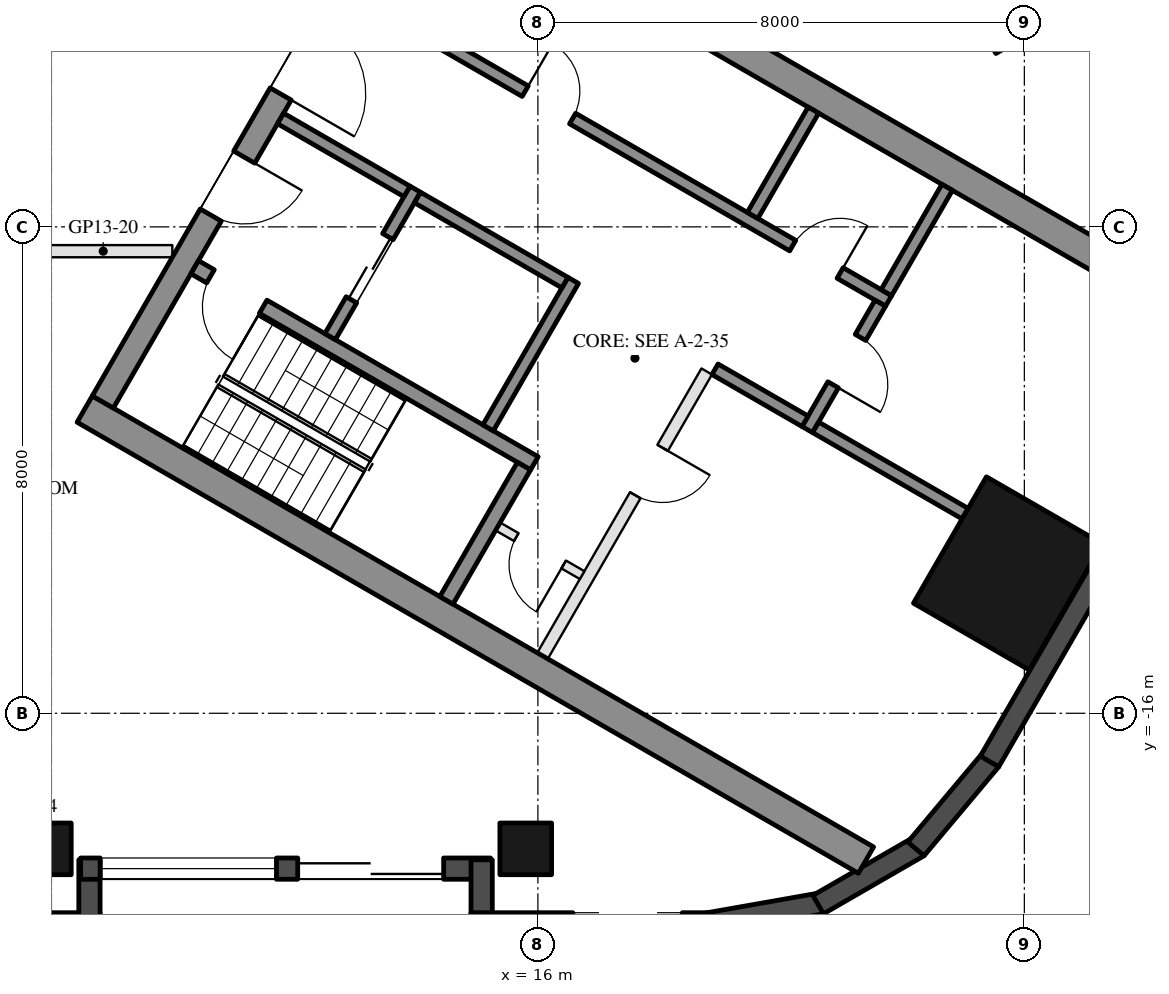
"""IFC4 building model, lengths in metres.
Left out: names, types, materials, properties, quantities, classifications, styles, units other than length and angle.
Written with IfcOpenShell. Run it as: python <this file> out.ifc"""

import sys

from ifc_helpers import new_model, si_unit, direction, frame, frame_2d, origin, origin_2d, place, context, subcontext, project, spatial, rectangle, hollow_rectangle, extrude, element, fill, save


model = new_model("IFC4")
c1 = context("Model", 3, precision=1e-05, world=origin(), true_north=direction((0.0, 1.0)))
c2 = subcontext(c1, "Body", "Model", "MODEL_VIEW")
j1 = project(units=[si_unit("LENGTHUNIT", "METRE"), si_unit("PLANEANGLEUNIT", "RADIAN")], contexts=[c1])
p1 = place(None, origin())
s1 = spatial("IfcSite", under=j1, at=p1, CompositionType="ELEMENT")
p2 = place(p1, origin())
s2 = spatial("IfcBuilding", under=s1, at=p2, CompositionType="ELEMENT")
p3 = place(p2, frame((0.0, 0.0, 154.0)))
s3 = spatial("IfcBuildingStorey", under=s2, at=p3, CompositionType="ELEMENT", Elevation=154.0)
for number, where, z_axis, x_axis in (
    (1, (7.9, -18.23, 0.0), (0.0, 0.0, 1.0), (-1.0, 0.0, 0.0)),
    (2, (15.8, -18.23, 0.0), (0.0, 0.0, 1.0), (-1.0, 0.0, 0.0)),
    (3, (23.688, -4.568, 0.0), (0.0, 0.0, 1.0), (-0.5, 0.866, 0.0)),
):
    element("IfcColumn", number, at=place(p3, frame(where, z_axis=z_axis, x_axis=x_axis)), inside=s3, PredefinedType="COLUMN", context=c2, shape_type="SweptSolid", body=[
        extrude(hollow_rectangle(XDim=0.85, YDim=0.85, WallThickness=0.04, at=origin_2d()), origin(), (0.0, 0.0, 1.0), 3.7),
    ])
p4 = place(p3, frame((23.729, -13.7, 0.0), z_axis=(0.0, 0.0, 1.0), x_axis=(0.5, 0.866025403784, 0.0)))
e4 = element("IfcColumn", 4, at=p4, inside=s3, PredefinedType="COLUMN", context=c2, shape_type="SweptSolid", body=[
    extrude(hollow_rectangle(XDim=2.4, YDim=2.2, WallThickness=0.06, at=origin_2d()), origin(), (0.0, 0.0, 1.0), 3.7),
])
p5 = place(p3, frame((-0.9, -19.455, 0.0), z_axis=(0.0, 0.0, 1.0), x_axis=(1.0, 0.0, 0.0)))
e5 = element("IfcWall", 5, at=p5, inside=s3, PredefinedType="SOLIDWALL", context=c2, shape_type="SweptSolid", body=[
    extrude(rectangle(XDim=9.7, YDim=0.35, at=frame_2d((4.85, 0.0))), origin(), (0.0, 0.0, 1.0), 3.55),
])
p6 = place(p5, frame((5.3, 0.0, 0.3)))
e6 = element("IfcOpeningElement", 6, at=p6, cuts=e5, PredefinedType="OPENING", context=c2, shape_type="SweptSolid", body=[
    extrude(rectangle(XDim=2.7, YDim=2.65, at=frame_2d((1.35, 1.325))), frame((0.0, 0.185, 0.0), z_axis=(0.0, -1.0, 0.0), x_axis=(1.0, 0.0, 0.0)), (0.0, 0.0, 1.0), 0.37),
])
p7 = place(p3, frame((8.625, -19.63, 0.0), z_axis=(0.0, 0.0, 1.0), x_axis=(0.0, 1.0, 0.0)))
e7 = element("IfcWall", 7, at=p7, inside=s3, PredefinedType="SOLIDWALL", context=c2, shape_type="SweptSolid", body=[
    extrude(rectangle(XDim=1.22, YDim=0.35, at=frame_2d((0.61, 0.0))), origin(), (0.0, 0.0, 1.0), 3.55),
])
p8 = place(p3, frame((8.48, -18.555, 0.0), z_axis=(0.0, 0.0, 1.0), x_axis=(1.0, 0.0, 0.0)))
e8 = element("IfcWall", 8, at=p8, inside=s3, PredefinedType="SOLIDWALL", context=c2, shape_type="SweptSolid", body=[
    extrude(rectangle(XDim=6.74, YDim=0.35, at=frame_2d((3.37, 0.0))), origin(), (0.0, 0.0, 1.0), 3.55),
])
p9 = place(p8, frame((3.57, 0.0, 0.0)))
e9 = element("IfcOpeningElement", 9, at=p9, cuts=e8, PredefinedType="OPENING", context=c2, shape_type="SweptSolid", body=[
    extrude(rectangle(XDim=2.4, YDim=2.4, at=frame_2d((1.2, 1.2))), frame((0.0, 0.185, 0.0), z_axis=(0.0, -1.0, 0.0), x_axis=(1.0, 0.0, 0.0)), (0.0, 0.0, 1.0), 0.37),
])
p10 = place(p8, frame((0.32, 0.0, 0.3)))
e10 = element("IfcOpeningElement", 10, at=p10, cuts=e8, PredefinedType="OPENING", context=c2, shape_type="SweptSolid", body=[
    extrude(rectangle(XDim=2.9, YDim=2.65, at=frame_2d((1.45, 1.325))), frame((0.0, 0.185, 0.0), z_axis=(0.0, -1.0, 0.0), x_axis=(1.0, 0.0, 0.0)), (0.0, 0.0, 1.0), 0.37),
])
p11 = place(p3, frame((15.075, -18.41, 0.0), z_axis=(0.0, 0.0, 1.0), x_axis=(0.0, -1.0, 0.0)))
e11 = element("IfcWall", 11, at=p11, inside=s3, PredefinedType="SOLIDWALL", context=c2, shape_type="SweptSolid", body=[
    extrude(rectangle(XDim=1.22, YDim=0.35, at=frame_2d((0.61, 0.0))), origin(), (0.0, 0.0, 1.0), 3.55),
])
p12 = place(p3, frame((14.9, -19.455, 0.0), z_axis=(0.0, 0.0, 1.0), x_axis=(1.0, 0.0, 0.0)))
e12 = element("IfcWall", 12, at=p12, inside=s3, PredefinedType="SOLIDWALL", context=c2, shape_type="SweptSolid", body=[
    extrude(rectangle(XDim=3.916, YDim=0.35, at=frame_2d((1.958, 0.0))), origin(), (0.0, 0.0, 1.0), 3.55),
])
p13 = place(p12, frame((1.675, 0.0, 0.3)))
e13 = element("IfcOpeningElement", 13, at=p13, cuts=e12, PredefinedType="OPENING", context=c2, shape_type="SweptSolid", body=[
    extrude(rectangle(XDim=1.8, YDim=2.65, at=frame_2d((0.9, 1.325))), frame((0.0, 0.185, 0.0), z_axis=(0.0, -1.0, 0.0), x_axis=(1.0, 0.0, 0.0)), (0.0, 0.0, 1.0), 0.37),
])
p14 = place(p3, frame((18.785, -19.458, 0.0), z_axis=(0.0, 0.0, 1.0), x_axis=(0.984798995425, 0.173697837091, 0.0)))
e14 = element("IfcWall", 14, at=p14, inside=s3, PredefinedType="SOLIDWALL", context=c2, shape_type="SweptSolid", body=[
    extrude(rectangle(XDim=1.91, YDim=0.35, at=frame_2d((0.955, 0.0))), origin(), (0.0, 0.0, 1.0), 3.55),
])
for number, where, z_axis, x_axis in (
    (15, (20.61, -19.147, 0.0), (0.0, 0.0, 1.0), (0.866, 0.5, 0.0)),
    (16, (22.217, -18.231, 0.0), (0.0, 0.0, 1.0), (0.643, 0.766, 0.0)),
):
    element("IfcWall", number, at=place(p3, frame(where, z_axis=z_axis, x_axis=x_axis)), inside=s3, PredefinedType="SOLIDWALL", context=c2, shape_type="SweptSolid", body=[
        extrude(rectangle(XDim=1.91, YDim=0.35, at=frame_2d((0.955, 0.0))), origin(), (0.0, 0.0, 1.0), 3.55),
    ])
p15 = place(p3, frame((23.427, -16.792, 0.0), z_axis=(0.0, 0.0, 1.0), x_axis=(0.500018773155, 0.866014564827, 0.0)))
e17 = element("IfcWall", 17, at=p15, inside=s3, PredefinedType="SOLIDWALL", context=c2, shape_type="SweptSolid", body=[
    extrude(rectangle(XDim=5.658, YDim=0.35, at=frame_2d((2.829, 0.0))), origin(), (0.0, 0.0, 1.0), 3.55),
])
p16 = place(p3, frame((26.257, -6.567, 0.0), z_axis=(0.0, 0.0, 1.0), x_axis=(-0.500023526245, 0.866011820475, 0.0)))
e18 = element("IfcWall", 18, at=p16, inside=s3, PredefinedType="SOLIDWALL", context=c2, shape_type="SweptSolid", body=[
    extrude(rectangle(XDim=11.816, YDim=0.35, at=frame_2d((5.908, 0.0))), origin(), (0.0, 0.0, 1.0), 3.55),
])
p17 = place(p16, frame((0.38, 0.0, 0.3)))
e19 = element("IfcOpeningElement", 19, at=p17, cuts=e18, PredefinedType="OPENING", context=c2, shape_type="SweptSolid", body=[
    extrude(rectangle(XDim=1.8, YDim=2.65, at=frame_2d((0.9, 1.325))), frame((0.0, 0.185, 0.0), z_axis=(0.0, -1.0, 0.0), x_axis=(1.0, 0.0, 0.0)), (0.0, 0.0, 1.0), 0.37),
])
p18 = place(p16, frame((7.741, 0.0, 0.0)))
e20 = element("IfcOpeningElement", 20, at=p18, cuts=e18, PredefinedType="OPENING", context=c2, shape_type="SweptSolid", body=[
    extrude(rectangle(XDim=2.4, YDim=2.4, at=frame_2d((1.2, 1.2))), frame((0.0, 0.185, 0.0), z_axis=(0.0, -1.0, 0.0), x_axis=(1.0, 0.0, 0.0)), (0.0, 0.0, 1.0), 0.37),
])
p19 = place(p16, frame((3.791, 0.0, 0.3)))
e21 = element("IfcOpeningElement", 21, at=p19, cuts=e18, PredefinedType="OPENING", context=c2, shape_type="SweptSolid", body=[
    extrude(rectangle(XDim=1.6, YDim=2.65, at=frame_2d((0.8, 1.325))), frame((0.0, 0.185, 0.0), z_axis=(0.0, -1.0, 0.0), x_axis=(1.0, 0.0, 0.0)), (0.0, 0.0, 1.0), 0.37),
])
p20 = place(p16, frame((5.691, 0.0, 0.3)))
e22 = element("IfcOpeningElement", 22, at=p20, cuts=e18, PredefinedType="OPENING", context=c2, shape_type="SweptSolid", body=[
    extrude(rectangle(XDim=1.6, YDim=2.65, at=frame_2d((0.8, 1.325))), frame((0.0, 0.185, 0.0), z_axis=(0.0, -1.0, 0.0), x_axis=(1.0, 0.0, 0.0)), (0.0, 0.0, 1.0), 0.37),
])
for number, where, z_axis, x_axis in (
    (23, (8.547, -10.997, 0.0), (0.0, 0.0, 1.0), (0.866, -0.5, 0.0)),
    (24, (13.797, -1.903, 0.0), (0.0, 0.0, 1.0), (0.866, -0.5, 0.0)),
):
    element("IfcWall", number, at=place(p3, frame(where, z_axis=z_axis, x_axis=x_axis)), inside=s3, PredefinedType="SHEAR", context=c2, shape_type="SweptSolid", body=[
        extrude(rectangle(XDim=14.837, YDim=0.5, at=frame_2d((7.418, 0.0))), origin(), (0.0, 0.0, 1.0), 3.5),
    ])
p21 = place(p3, frame((8.845, -10.88, 0.0), z_axis=(0.0, 0.0, 1.0), x_axis=(0.500004234368, 0.866022959057, 0.0)))
e25 = element("IfcWall", 25, at=p21, inside=s3, PredefinedType="SHEAR", context=c2, shape_type="SweptSolid", body=[
    extrude(rectangle(XDim=10.0, YDim=0.4, at=frame_2d((5.0, 0.0))), origin(), (0.0, 0.0, 1.0), 3.5),
])
p22 = place(p21, frame((3.55, 0.0, 0.0)))
e26 = element("IfcOpeningElement", 26, at=p22, cuts=e25, PredefinedType="OPENING", context=c2, shape_type="SweptSolid", body=[
    extrude(rectangle(XDim=1.1, YDim=2.1, at=frame_2d((0.55, 1.05))), frame((0.0, 0.21, 0.0), z_axis=(0.0, -1.0, 0.0), x_axis=(1.0, 0.0, 0.0)), (0.0, 0.0, 1.0), 0.42),
])
p23 = place(p21, frame((5.85, 0.0, 0.0)))
e27 = element("IfcOpeningElement", 27, at=p23, cuts=e25, PredefinedType="OPENING", context=c2, shape_type="SweptSolid", body=[
    extrude(rectangle(XDim=1.4, YDim=2.1, at=frame_2d((0.7, 1.05))), frame((0.0, 0.21, 0.0), z_axis=(0.0, -1.0, 0.0), x_axis=(1.0, 0.0, 0.0)), (0.0, 0.0, 1.0), 0.42),
])
p24 = place(p3, frame((10.356, -8.664, 0.0), z_axis=(0.0, 0.0, 1.0), x_axis=(0.866028629588, -0.499994412703, 0.0)))
e28 = element("IfcWall", 28, at=p24, inside=s3, PredefinedType="SHEAR", context=c2, shape_type="SweptSolid", body=[
    extrude(rectangle(XDim=6.45, YDim=0.25, at=frame_2d((3.225, 0.0))), origin(), (0.0, 0.0, 1.0), 3.5),
])
p25 = place(p24, frame((0.3, 0.0, 0.0)))
e29 = element("IfcOpeningElement", 29, at=p25, cuts=e28, PredefinedType="OPENING", context=c2, shape_type="SweptSolid", body=[
    extrude(rectangle(XDim=1.0, YDim=2.1, at=frame_2d((0.5, 1.05))), frame((0.0, 0.135, 0.0), z_axis=(0.0, -1.0, 0.0), x_axis=(1.0, 0.0, 0.0)), (0.0, 0.0, 1.0), 0.27),
])
p26 = place(p3, frame((14.496, -14.143, 0.0), z_axis=(0.0, 0.0, 1.0), x_axis=(0.500062241894, 0.865989465428, 0.0)))
e30 = element("IfcWall", 30, at=p26, inside=s3, PredefinedType="SHEAR", context=c2, shape_type="SweptSolid", body=[
    extrude(rectangle(XDim=2.55, YDim=0.25, at=frame_2d((1.275, 0.0))), origin(), (0.0, 0.0, 1.0), 3.5),
])
p27 = place(p3, frame((15.181, -11.305, 0.0), z_axis=(0.0, 0.0, 1.0), x_axis=(0.49994636267, 0.866056369097, 0.0)))
e31 = element("IfcWall", 31, at=p27, inside=s3, PredefinedType="SHEAR", context=c2, shape_type="SweptSolid", body=[
    extrude(rectangle(XDim=2.8, YDim=0.2, at=frame_2d((1.4, 0.0))), origin(), (0.0, 0.0, 1.0), 3.5),
])
p28 = place(p3, frame((12.583, -9.805, 0.0), z_axis=(0.0, 0.0, 1.0), x_axis=(0.49994636267, 0.866056369097, 0.0)))
e32 = element("IfcWall", 32, at=p28, inside=s3, PredefinedType="SHEAR", context=c2, shape_type="SweptSolid", body=[
    extrude(rectangle(XDim=2.8, YDim=0.2, at=frame_2d((1.4, 0.0))), origin(), (0.0, 0.0, 1.0), 3.5),
])
p29 = place(p28, frame((0.7, 0.0, 0.0)))
e33 = element("IfcOpeningElement", 33, at=p29, cuts=e32, PredefinedType="OPENING", context=c2, shape_type="SweptSolid", body=[
    extrude(rectangle(XDim=1.2, YDim=2.1, at=frame_2d((0.6, 1.05))), frame((0.0, 0.11, 0.0), z_axis=(0.0, -1.0, 0.0), x_axis=(1.0, 0.0, 0.0)), (0.0, 0.0, 1.0), 0.22),
])
p30 = place(p3, frame((11.768, -6.217, 0.0), z_axis=(0.0, 0.0, 1.0), x_axis=(0.866050077142, -0.499957262057, 0.0)))
e34 = element("IfcWall", 34, at=p30, inside=s3, PredefinedType="SHEAR", context=c2, shape_type="SweptSolid", body=[
    extrude(rectangle(XDim=2.4, YDim=0.2, at=frame_2d((1.2, 0.0))), origin(), (0.0, 0.0, 1.0), 3.5),
])
p31 = place(p3, frame((14.02, -7.517, 0.0), z_axis=(0.0, 0.0, 1.0), x_axis=(0.866034573852, -0.49998411664, 0.0)))
e35 = element("IfcWall", 35, at=p31, inside=s3, PredefinedType="SHEAR", context=c2, shape_type="SweptSolid", body=[
    extrude(rectangle(XDim=2.8, YDim=0.2, at=frame_2d((1.4, 0.0))), origin(), (0.0, 0.0, 1.0), 3.5),
])
p32 = place(p3, frame((12.968, -4.138, 0.0), z_axis=(0.0, 0.0, 1.0), x_axis=(0.866028328073, -0.49999493495, 0.0)))
e36 = element("IfcWall", 36, at=p32, inside=s3, PredefinedType="SHEAR", context=c2, shape_type="SweptSolid", body=[
    extrude(rectangle(XDim=10.16, YDim=0.2, at=frame_2d((5.08, 0.0))), origin(), (0.0, 0.0, 1.0), 3.5),
])
p33 = place(p32, frame((3.26, 0.0, 0.0)))
e37 = element("IfcOpeningElement", 37, at=p33, cuts=e36, PredefinedType="OPENING", context=c2, shape_type="SweptSolid", body=[
    extrude(rectangle(XDim=0.9, YDim=2.1, at=frame_2d((0.45, 1.05))), frame((0.0, 0.11, 0.0), z_axis=(0.0, -1.0, 0.0), x_axis=(1.0, 0.0, 0.0)), (0.0, 0.0, 1.0), 0.22),
])
p34 = place(p32, frame((8.34, 0.0, 0.0)))
e38 = element("IfcOpeningElement", 38, at=p34, cuts=e36, PredefinedType="OPENING", context=c2, shape_type="SweptSolid", body=[
    extrude(rectangle(XDim=0.9, YDim=2.1, at=frame_2d((0.45, 1.05))), frame((0.0, 0.11, 0.0), z_axis=(0.0, -1.0, 0.0), x_axis=(1.0, 0.0, 0.0)), (0.0, 0.0, 1.0), 0.22),
])
p35 = place(p3, frame((20.43, -11.333, 0.0), z_axis=(0.0, 0.0, 1.0), x_axis=(0.500001309137, 0.866024647952, 0.0)))
e39 = element("IfcWall", 39, at=p35, inside=s3, PredefinedType="SHEAR", context=c2, shape_type="SweptSolid", body=[
    extrude(rectangle(XDim=2.4, YDim=0.2, at=frame_2d((1.2, 0.0))), origin(), (0.0, 0.0, 1.0), 3.5),
])
p36 = place(p35, frame((0.85, 0.0, 0.0)))
e40 = element("IfcOpeningElement", 40, at=p36, cuts=e39, PredefinedType="OPENING", context=c2, shape_type="SweptSolid", body=[
    extrude(rectangle(XDim=0.9, YDim=2.1, at=frame_2d((0.45, 1.05))), frame((0.0, 0.11, 0.0), z_axis=(0.0, -1.0, 0.0), x_axis=(1.0, 0.0, 0.0)), (0.0, 0.0, 1.0), 0.22),
])
p37 = place(p3, frame((18.913, -10.342, 0.0), z_axis=(0.0, 0.0, 1.0), x_axis=(0.866038183914, -0.499977863513, 0.0)))
e41 = element("IfcWall", 41, at=p37, inside=s3, PredefinedType="SHEAR", context=c2, shape_type="SweptSolid", body=[
    extrude(rectangle(XDim=1.71, YDim=0.2, at=frame_2d((0.855, 0.0))), origin(), (0.0, 0.0, 1.0), 3.5),
])
for number, where, z_axis, x_axis in (
    (42, (19.531, -7.812, 0.0), (0.0, 0.0, 1.0), (0.5, 0.866, 0.0)),
    (43, (21.73, -9.082, 0.0), (0.0, 0.0, 1.0), (0.5, 0.866, 0.0)),
):
    element("IfcWall", number, at=place(p3, frame(where, z_axis=z_axis, x_axis=x_axis)), inside=s3, PredefinedType="SHEAR", context=c2, shape_type="SweptSolid", body=[
        extrude(rectangle(XDim=2.0, YDim=0.2, at=frame_2d((1.0, 0.0))), origin(), (0.0, 0.0, 1.0), 3.5),
    ])
p38 = place(p3, frame((20.567, -11.297, 0.0), z_axis=(0.0, 0.0, 1.0), x_axis=(0.866055327414, -0.49994816717, 0.0)))
e44 = element("IfcWall", 44, at=p38, inside=s3, PredefinedType="SHEAR", context=c2, shape_type="SweptSolid", body=[
    extrude(rectangle(XDim=2.84, YDim=0.2, at=frame_2d((1.42, 0.0))), origin(), (0.0, 0.0, 1.0), 3.5),
])
p39 = place(p3, frame((16.076, -15.055, 0.0), z_axis=(0.0, 0.0, 1.0), x_axis=(0.499995103361, 0.866028230842, 0.0)))
e45 = element("IfcWall", 45, at=p39, inside=s3, PredefinedType="PARTITIONING", context=c2, shape_type="SweptSolid", body=[
    extrude(rectangle(XDim=5.4, YDim=0.2, at=frame_2d((2.7, 0.0))), origin(), (0.0, 0.0, 1.0), 3.5),
])
p40 = place(p39, frame((3.05, 0.0, 0.0)))
e46 = element("IfcOpeningElement", 46, at=p40, cuts=e45, PredefinedType="OPENING", context=c2, shape_type="SweptSolid", body=[
    extrude(rectangle(XDim=0.9, YDim=2.1, at=frame_2d((0.45, 1.05))), frame((0.0, 0.11, 0.0), z_axis=(0.0, -1.0, 0.0), x_axis=(1.0, 0.0, 0.0)), (0.0, 0.0, 1.0), 0.22),
])
p41 = place(p3, frame((15.342, -12.928, 0.0), z_axis=(0.0, 0.0, 1.0), x_axis=(0.865989903783, -0.500061482766, 0.0)))
e47 = element("IfcWall", 47, at=p41, inside=s3, PredefinedType="PARTITIONING", context=c2, shape_type="SweptSolid", body=[
    extrude(rectangle(XDim=1.6, YDim=0.15, at=frame_2d((0.8, 0.0))), origin(), (0.0, 0.0, 1.0), 3.5),
])
p42 = place(p41, frame((0.35, 0.0, 0.0)))
e48 = element("IfcOpeningElement", 48, at=p42, cuts=e47, PredefinedType="OPENING", context=c2, shape_type="SweptSolid", body=[
    extrude(rectangle(XDim=0.9, YDim=2.1, at=frame_2d((0.45, 1.05))), frame((0.0, 0.085, 0.0), z_axis=(0.0, -1.0, 0.0), x_axis=(1.0, 0.0, 0.0)), (0.0, 0.0, 1.0), 0.17),
])
p43 = place(p3, frame((9.988, -8.4, 0.0), z_axis=(0.0, 0.0, 1.0), x_axis=(-1.0, 0.0, 0.0)))
e49 = element("IfcWall", 49, at=p43, inside=s3, PredefinedType="PARTITIONING", context=c2, shape_type="SweptSolid", body=[
    extrude(rectangle(XDim=5.686, YDim=0.2, at=frame_2d((2.843, 0.0))), origin(), (0.0, 0.0, 1.0), 2.95),
])
p44 = place(p43, frame((2.343, 0.0, 0.0)))
e50 = element("IfcOpeningElement", 50, at=p44, cuts=e49, PredefinedType="OPENING", context=c2, shape_type="SweptSolid", body=[
    extrude(rectangle(XDim=1.0, YDim=2.1, at=frame_2d((0.5, 1.05))), frame((0.0, 0.11, 0.0), z_axis=(0.0, -1.0, 0.0), x_axis=(1.0, 0.0, 0.0)), (0.0, 0.0, 1.0), 0.22),
])
p45 = place(p9, frame((2.4, 0.0, 0.0), z_axis=(0.0, 0.0, 1.0), x_axis=(-1.0, 0.0, 0.0)))
e51 = element("IfcDoor", 51, at=p45, inside=s3, OperationType="SLIDING_TO_LEFT", PredefinedType="DOOR", context=c2, shape_type="SweptSolid", body=[
    extrude(rectangle(XDim=2.4, YDim=2.4, at=frame_2d((1.2, 1.2))), frame((0.0, 0.025, 0.0), z_axis=(0.0, -1.0, 0.0), x_axis=(1.0, 0.0, 0.0)), (0.0, 0.0, 1.0), 0.05),
])
fill(e9, e51)
p46 = place(p10, origin())
e52 = element("IfcWindow", 52, at=p46, inside=s3, PartitioningType="SINGLE_PANEL", PredefinedType="WINDOW", context=c2, shape_type="SweptSolid", body=[
    extrude(rectangle(XDim=2.9, YDim=2.65, at=frame_2d((1.45, 1.325))), frame((0.0, 0.03, 0.0), z_axis=(0.0, -1.0, 0.0), x_axis=(1.0, 0.0, 0.0)), (0.0, 0.0, 1.0), 0.06),
])
fill(e10, e52)
p47 = place(p29, origin())
e53 = element("IfcDoor", 53, at=p47, inside=s3, OperationType="DOUBLE_DOOR_SLIDING", PredefinedType="DOOR", context=c2, shape_type="SweptSolid", body=[
    extrude(rectangle(XDim=1.2, YDim=2.1, at=frame_2d((0.6, 1.05))), frame((0.0, 0.025, 0.0), z_axis=(0.0, -1.0, 0.0), x_axis=(1.0, 0.0, 0.0)), (0.0, 0.0, 1.0), 0.05),
])
fill(e33, e53)
p48 = place(p42, frame((0.9, 0.0, 0.0), z_axis=(0.0, 0.0, 1.0), x_axis=(-1.0, 0.0, 0.0)))
e54 = element("IfcDoor", 54, at=p48, inside=s3, OperationType="SINGLE_SWING_LEFT", PredefinedType="DOOR", context=c2, shape_type="SweptSolid", body=[
    extrude(rectangle(XDim=0.9, YDim=2.1, at=frame_2d((0.45, 1.05))), frame((0.0, 0.025, 0.0), z_axis=(0.0, -1.0, 0.0), x_axis=(1.0, 0.0, 0.0)), (0.0, 0.0, 1.0), 0.05),
])
fill(e48, e54)
p49 = place(p33, origin())
e55 = element("IfcDoor", 55, at=p49, inside=s3, OperationType="SINGLE_SWING_LEFT", PredefinedType="DOOR", context=c2, shape_type="SweptSolid", body=[
    extrude(rectangle(XDim=0.9, YDim=2.1, at=frame_2d((0.45, 1.05))), frame((0.0, 0.025, 0.0), z_axis=(0.0, -1.0, 0.0), x_axis=(1.0, 0.0, 0.0)), (0.0, 0.0, 1.0), 0.05),
])
fill(e37, e55)
p50 = place(p34, origin())
e56 = element("IfcDoor", 56, at=p50, inside=s3, OperationType="SINGLE_SWING_RIGHT", PredefinedType="DOOR", context=c2, shape_type="SweptSolid", body=[
    extrude(rectangle(XDim=0.9, YDim=2.1, at=frame_2d((0.45, 1.05))), frame((0.0, 0.025, 0.0), z_axis=(0.0, -1.0, 0.0), x_axis=(1.0, 0.0, 0.0)), (0.0, 0.0, 1.0), 0.05),
])
fill(e38, e56)
p51 = place(p36, frame((0.9, 0.0, 0.0), z_axis=(0.0, 0.0, 1.0), x_axis=(-1.0, 0.0, 0.0)))
e57 = element("IfcDoor", 57, at=p51, inside=s3, OperationType="SINGLE_SWING_RIGHT", PredefinedType="DOOR", context=c2, shape_type="SweptSolid", body=[
    extrude(rectangle(XDim=0.9, YDim=2.1, at=frame_2d((0.45, 1.05))), frame((0.0, 0.025, 0.0), z_axis=(0.0, -1.0, 0.0), x_axis=(1.0, 0.0, 0.0)), (0.0, 0.0, 1.0), 0.05),
])
fill(e40, e57)
p52 = place(p40, frame((0.9, 0.0, 0.0), z_axis=(0.0, 0.0, 1.0), x_axis=(-1.0, 0.0, 0.0)))
e58 = element("IfcDoor", 58, at=p52, inside=s3, OperationType="SINGLE_SWING_LEFT", PredefinedType="DOOR", context=c2, shape_type="SweptSolid", body=[
    extrude(rectangle(XDim=0.9, YDim=2.1, at=frame_2d((0.45, 1.05))), frame((0.0, 0.025, 0.0), z_axis=(0.0, -1.0, 0.0), x_axis=(1.0, 0.0, 0.0)), (0.0, 0.0, 1.0), 0.05),
])
fill(e46, e58)
p53 = place(p22, frame((1.1, 0.0, 0.0), z_axis=(0.0, 0.0, 1.0), x_axis=(-1.0, 0.0, 0.0)))
e59 = element("IfcDoor", 59, at=p53, inside=s3, OperationType="SINGLE_SWING_LEFT", PredefinedType="DOOR", context=c2, shape_type="SweptSolid", body=[
    extrude(rectangle(XDim=1.1, YDim=2.1, at=frame_2d((0.55, 1.05))), frame((0.0, 0.025, 0.0), z_axis=(0.0, -1.0, 0.0), x_axis=(1.0, 0.0, 0.0)), (0.0, 0.0, 1.0), 0.05),
])
fill(e26, e59)
p54 = place(p23, frame((1.4, 0.0, 0.0), z_axis=(0.0, 0.0, 1.0), x_axis=(-1.0, 0.0, 0.0)))
e60 = element("IfcDoor", 60, at=p54, inside=s3, OperationType="DOUBLE_DOOR_SINGLE_SWING", PredefinedType="DOOR", context=c2, shape_type="SweptSolid", body=[
    extrude(rectangle(XDim=1.4, YDim=2.1, at=frame_2d((0.7, 1.05))), frame((0.0, 0.025, 0.0), z_axis=(0.0, -1.0, 0.0), x_axis=(1.0, 0.0, 0.0)), (0.0, 0.0, 1.0), 0.05),
])
fill(e27, e60)
p55 = place(p25, frame((1.0, 0.0, 0.0), z_axis=(0.0, 0.0, 1.0), x_axis=(-1.0, 0.0, 0.0)))
e61 = element("IfcDoor", 61, at=p55, inside=s3, OperationType="SINGLE_SWING_LEFT", PredefinedType="DOOR", context=c2, shape_type="SweptSolid", body=[
    extrude(rectangle(XDim=1.0, YDim=2.1, at=frame_2d((0.5, 1.05))), frame((0.0, 0.025, 0.0), z_axis=(0.0, -1.0, 0.0), x_axis=(1.0, 0.0, 0.0)), (0.0, 0.0, 1.0), 0.05),
])
fill(e29, e61)
save(model, sys.argv[1])
